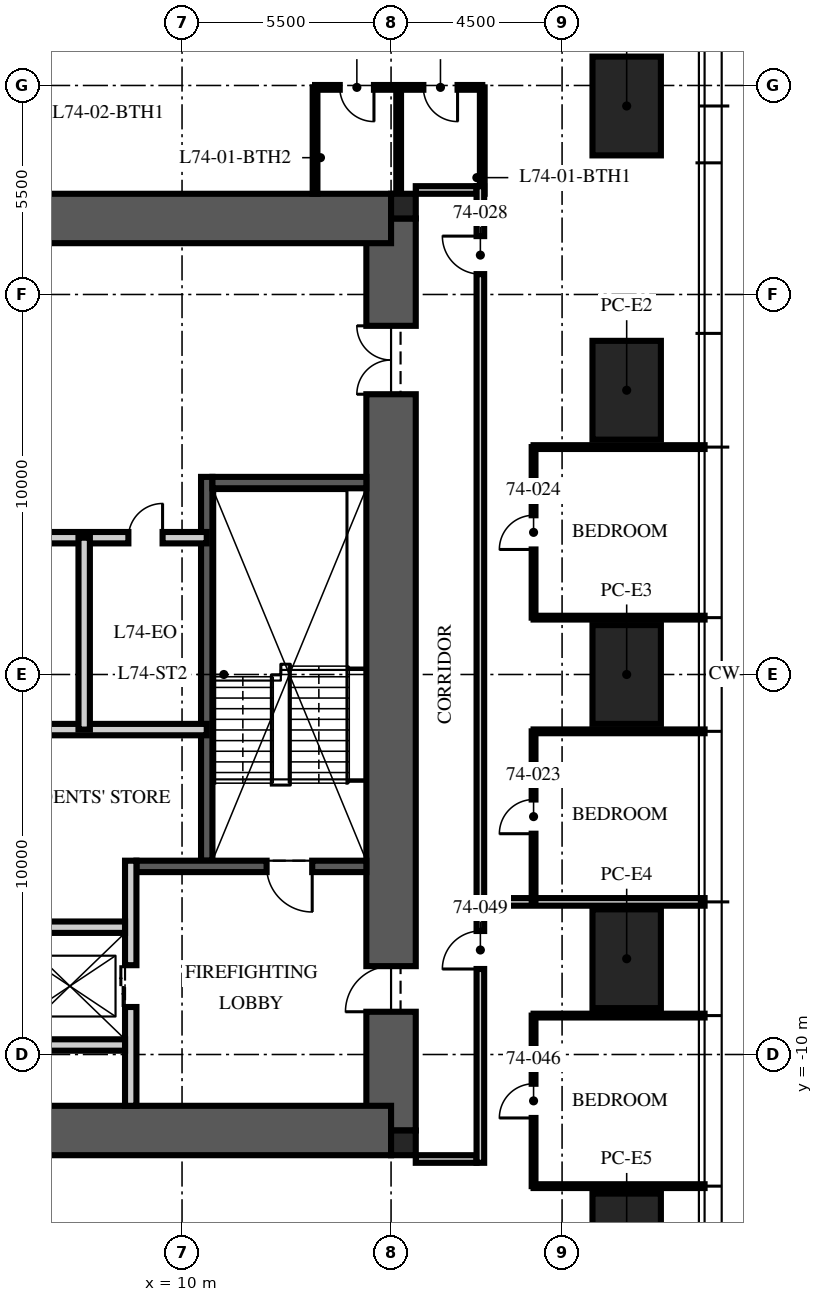
"""IFC4 building model, lengths in metres.
Left out: names, types, materials, properties, quantities, classifications, styles, units other than length and angle.
Written with IfcOpenShell. Run it as: python <this file> out.ifc"""

import sys

from ifc_helpers import new_model, si_unit, direction, frame, frame_2d, origin, origin_2d, place, context, subcontext, project, spatial, rectangle, extrude, element, fill, save


model = new_model("IFC4")
c1 = context("Model", 3, precision=1e-05, world=origin(), true_north=direction((0.0, 1.0)))
c2 = subcontext(c1, "Body", "Model", "MODEL_VIEW")
j1 = project(units=[si_unit("LENGTHUNIT", "METRE"), si_unit("PLANEANGLEUNIT", "RADIAN")], contexts=[c1])
p1 = place(None, origin())
s1 = spatial("IfcSite", under=j1, at=p1, CompositionType="ELEMENT")
p2 = place(p1, origin())
s2 = spatial("IfcBuilding", under=s1, at=p2, CompositionType="ELEMENT")
p3 = place(p2, frame((0.0, 0.0, 297.0)))
s3 = spatial("IfcBuildingStorey", under=s2, at=p3, CompositionType="ELEMENT", Elevation=297.0)
p4 = place(p3, frame((15.5, -12.0, -0.25), z_axis=(0.0, 0.0, 1.0), x_axis=(0.0, 1.0, 0.0)))
e1 = element("IfcWall", 1, at=p4, inside=s3, PredefinedType="SHEAR", context=c2, shape_type="SweptSolid", body=[
    extrude(rectangle(XDim=24.0, YDim=1.3, at=frame_2d((12.0, 0.0))), origin(), (0.0, 0.0, 1.0), 3.75),
])
p5 = place(p4, frame((3.125, 0.0, 0.25)))
e2 = element("IfcOpeningElement", 2, at=p5, cuts=e1, PredefinedType="OPENING", context=c2, shape_type="SweptSolid", body=[
    extrude(rectangle(XDim=1.2, YDim=2.1, at=frame_2d((0.6, 1.05))), frame((0.0, 0.66, 0.0), z_axis=(0.0, -1.0, 0.0), x_axis=(1.0, 0.0, 0.0)), (0.0, 0.0, 1.0), 1.32),
])
p6 = place(p4, frame((19.375, 0.0, 0.25)))
e3 = element("IfcOpeningElement", 3, at=p6, cuts=e1, PredefinedType="OPENING", context=c2, shape_type="SweptSolid", body=[
    extrude(rectangle(XDim=1.8, YDim=2.1, at=frame_2d((0.9, 1.05))), frame((0.0, 0.66, 0.0), z_axis=(0.0, -1.0, 0.0), x_axis=(1.0, 0.0, 0.0)), (0.0, 0.0, 1.0), 1.32),
])
for number, where, z_axis, x_axis in (
    (4, (-15.5, 12.0, -0.25), (0.0, 0.0, 1.0), (1.0, 0.0, 0.0)),
    (5, (-15.5, -12.0, -0.25), (0.0, 0.0, 1.0), (1.0, 0.0, 0.0)),
):
    element("IfcWall", number, at=place(p3, frame(where, z_axis=z_axis, x_axis=x_axis)), inside=s3, PredefinedType="SHEAR", context=c2, shape_type="SweptSolid", body=[
        extrude(rectangle(XDim=31.0, YDim=1.3, at=frame_2d((15.5, 0.0))), origin(), (0.0, 0.0, 1.0), 3.75),
    ])
for number, where, z_axis, x_axis in (
    (6, (15.825, 12.325, -0.25), (0.0, 0.0, 1.0), (1.0, 0.0, 0.0)),
    (7, (15.825, -12.325, -0.25), (0.0, 0.0, 1.0), (1.0, 0.0, 0.0)),
):
    element("IfcColumn", number, at=place(p3, frame(where, z_axis=z_axis, x_axis=x_axis)), inside=s3, PredefinedType="COLUMN", context=c2, shape_type="SweptSolid", body=[
        extrude(rectangle(XDim=0.65, YDim=0.65, at=origin_2d()), origin(), (0.0, 0.0, 1.0), 3.75),
    ])
for number, where, z_axis, x_axis in (
    (8, (21.7, 14.96, 0.0), (0.0, 0.0, 1.0), (0.0, 1.0, 0.0)),
    (9, (21.7, 7.48, 0.0), (0.0, 0.0, 1.0), (0.0, 1.0, 0.0)),
    (10, (21.7, 0.0, 0.0), (0.0, 0.0, 1.0), (0.0, 1.0, 0.0)),
    (11, (21.7, -7.48, 0.0), (0.0, 0.0, 1.0), (0.0, 1.0, 0.0)),
    (12, (21.7, -14.96, 0.0), (0.0, 0.0, 1.0), (0.0, 1.0, 0.0)),
):
    element("IfcColumn", number, at=place(p3, frame(where, z_axis=z_axis, x_axis=x_axis)), inside=s3, PredefinedType="COLUMN", context=c2, shape_type="SweptSolid", body=[
        extrude(rectangle(XDim=2.6, YDim=1.8, at=origin_2d()), origin(), (0.0, 0.0, 1.0), 3.75),
    ])
p7 = place(p3, frame((10.65, -4.9, 0.0), z_axis=(0.0, 0.0, 1.0), x_axis=(0.0, 1.0, 0.0)))
e13 = element("IfcWall", 13, at=p7, inside=s3, PredefinedType="SOLIDWALL", context=c2, shape_type="SweptSolid", body=[
    extrude(rectangle(XDim=10.1, YDim=0.3, at=frame_2d((5.05, 0.0))), origin(), (0.0, 0.0, 1.0), 3.5),
])
p8 = place(p3, frame((14.85, -5.05, 0.0), z_axis=(0.0, 0.0, 1.0), x_axis=(-1.0, 0.0, 0.0)))
e14 = element("IfcWall", 14, at=p8, inside=s3, PredefinedType="SOLIDWALL", context=c2, shape_type="SweptSolid", body=[
    extrude(rectangle(XDim=6.05, YDim=0.3, at=frame_2d((3.025, 0.0))), origin(), (0.0, 0.0, 1.0), 3.5),
])
p9 = place(p8, frame((1.425, 0.0, 0.0)))
e15 = element("IfcOpeningElement", 15, at=p9, cuts=e14, PredefinedType="OPENING", context=c2, shape_type="SweptSolid", body=[
    extrude(rectangle(XDim=1.2, YDim=2.1, at=frame_2d((0.6, 1.05))), frame((0.0, 0.16, 0.0), z_axis=(0.0, -1.0, 0.0), x_axis=(1.0, 0.0, 0.0)), (0.0, 0.0, 1.0), 0.32),
])
p10 = place(p3, frame((14.85, 5.05, 0.0), z_axis=(0.0, 0.0, 1.0), x_axis=(-1.0, 0.0, 0.0)))
e16 = element("IfcWall", 16, at=p10, inside=s3, PredefinedType="SOLIDWALL", context=c2, shape_type="SweptSolid", body=[
    extrude(rectangle(XDim=4.05, YDim=0.3, at=frame_2d((2.025, 0.0))), origin(), (0.0, 0.0, 1.0), 3.5),
])
p11 = place(p3, frame((8.65, -11.35, 0.0), z_axis=(0.0, 0.0, 1.0), x_axis=(0.0, 1.0, 0.0)))
e17 = element("IfcWall", 17, at=p11, inside=s3, PredefinedType="PARTITIONING", context=c2, shape_type="SweptSolid", body=[
    extrude(rectangle(XDim=6.45, YDim=0.3, at=frame_2d((3.225, 0.0))), origin(), (0.0, 0.0, 1.0), 3.5),
])
p12 = place(p11, frame((2.6, 0.0, 0.0)))
e18 = element("IfcOpeningElement", 18, at=p12, cuts=e17, PredefinedType="OPENING", context=c2, shape_type="SweptSolid", body=[
    extrude(rectangle(XDim=1.1, YDim=2.1, at=frame_2d((0.55, 1.05))), frame((0.0, 0.16, 0.0), z_axis=(0.0, -1.0, 0.0), x_axis=(1.0, 0.0, 0.0)), (0.0, 0.0, 1.0), 0.32),
])
p13 = place(p3, frame((-8.5, -6.65, 0.0), z_axis=(0.0, 0.0, 1.0), x_axis=(1.0, 0.0, 0.0)))
e19 = element("IfcWall", 19, at=p13, inside=s3, PredefinedType="PARTITIONING", context=c2, shape_type="SweptSolid", body=[
    extrude(rectangle(XDim=17.0, YDim=0.3, at=frame_2d((8.5, 0.0))), origin(), (0.0, 0.0, 1.0), 3.5),
])
p14 = place(p13, frame((7.8, 0.0, 0.0)))
e20 = element("IfcOpeningElement", 20, at=p14, cuts=e19, PredefinedType="OPENING", context=c2, shape_type="SweptSolid", body=[
    extrude(rectangle(XDim=1.3, YDim=2.4, at=frame_2d((0.65, 1.2))), frame((0.0, 0.16, 0.0), z_axis=(0.0, -1.0, 0.0), x_axis=(1.0, 0.0, 0.0)), (0.0, 0.0, 1.0), 0.32),
])
p15 = place(p13, frame((5.65, 0.0, 0.0)))
e21 = element("IfcOpeningElement", 21, at=p15, cuts=e19, PredefinedType="OPENING", context=c2, shape_type="SweptSolid", body=[
    extrude(rectangle(XDim=0.9, YDim=2.1, at=frame_2d((0.45, 1.05))), frame((0.0, 0.16, 0.0), z_axis=(0.0, -1.0, 0.0), x_axis=(1.0, 0.0, 0.0)), (0.0, 0.0, 1.0), 0.32),
])
p16 = place(p13, frame((10.4, 0.0, 0.0)))
e22 = element("IfcOpeningElement", 22, at=p16, cuts=e19, PredefinedType="OPENING", context=c2, shape_type="SweptSolid", body=[
    extrude(rectangle(XDim=0.9, YDim=2.1, at=frame_2d((0.45, 1.05))), frame((0.0, 0.16, 0.0), z_axis=(0.0, -1.0, 0.0), x_axis=(1.0, 0.0, 0.0)), (0.0, 0.0, 1.0), 0.32),
])
p17 = place(p3, frame((5.6, -9.75, 0.0), z_axis=(0.0, 0.0, 1.0), x_axis=(1.0, 0.0, 0.0)))
e23 = element("IfcWall", 23, at=p17, inside=s3, PredefinedType="PARTITIONING", context=c2, shape_type="SweptSolid", body=[
    extrude(rectangle(XDim=2.9, YDim=0.3, at=frame_2d((1.45, 0.0))), origin(), (0.0, 0.0, 1.0), 3.5),
])
p18 = place(p3, frame((-10.65, 3.6, 0.0), z_axis=(0.0, 0.0, 1.0), x_axis=(1.0, 0.0, 0.0)))
e24 = element("IfcWall", 24, at=p18, inside=s3, PredefinedType="PARTITIONING", context=c2, shape_type="SweptSolid", body=[
    extrude(rectangle(XDim=21.3, YDim=0.3, at=frame_2d((10.65, 0.0))), origin(), (0.0, 0.0, 1.0), 3.5),
])
p19 = place(p18, frame((10.05, 0.0, 0.0)))
e25 = element("IfcOpeningElement", 25, at=p19, cuts=e24, PredefinedType="OPENING", context=c2, shape_type="SweptSolid", body=[
    extrude(rectangle(XDim=1.2, YDim=2.1, at=frame_2d((0.6, 1.05))), frame((0.0, 0.16, 0.0), z_axis=(0.0, -1.0, 0.0), x_axis=(1.0, 0.0, 0.0)), (0.0, 0.0, 1.0), 0.32),
])
p20 = place(p18, frame((19.238, 0.0, 0.0)))
e26 = element("IfcOpeningElement", 26, at=p20, cuts=e24, PredefinedType="OPENING", context=c2, shape_type="SweptSolid", body=[
    extrude(rectangle(XDim=0.9, YDim=2.1, at=frame_2d((0.45, 1.05))), frame((0.0, 0.16, 0.0), z_axis=(0.0, -1.0, 0.0), x_axis=(1.0, 0.0, 0.0)), (0.0, 0.0, 1.0), 0.32),
])
p21 = place(p3, frame((10.65, -1.45, 0.0), z_axis=(0.0, 0.0, 1.0), x_axis=(-1.0, 0.0, 0.0)))
e27 = element("IfcWall", 27, at=p21, inside=s3, PredefinedType="PARTITIONING", context=c2, shape_type="SweptSolid", body=[
    extrude(rectangle(XDim=6.45, YDim=0.3, at=frame_2d((3.225, 0.0))), origin(), (0.0, 0.0, 1.0), 3.5),
])
p22 = place(p3, frame((7.425, -1.45, 0.0), z_axis=(0.0, 0.0, 1.0), x_axis=(0.0, 1.0, 0.0)))
e28 = element("IfcWall", 28, at=p22, inside=s3, PredefinedType="PARTITIONING", context=c2, shape_type="SweptSolid", body=[
    extrude(rectangle(XDim=5.05, YDim=0.3, at=frame_2d((2.525, 0.0))), origin(), (0.0, 0.0, 1.0), 3.5),
])
for number, where, z_axis, x_axis in (
    (29, (16.15, 12.75, 0.0), (0.0, 0.0, 1.0), (1.0, 0.0, 0.0)),
    (30, (16.15, -12.75, 0.0), (0.0, 0.0, 1.0), (1.0, 0.0, 0.0)),
):
    element("IfcWall", number, at=place(p3, frame(where, z_axis=z_axis, x_axis=x_axis)), inside=s3, PredefinedType="PARTITIONING", context=c2, shape_type="SweptSolid", body=[
        extrude(rectangle(XDim=1.6, YDim=0.2, at=frame_2d((0.8, 0.0))), origin(), (0.0, 0.0, 1.0), 2.6),
    ])
p23 = place(p3, frame((17.95, -5.984, 0.0), z_axis=(0.0, 0.0, 1.0), x_axis=(1.0, 0.0, 0.0)))
e31 = element("IfcWall", 31, at=p23, inside=s3, PredefinedType="PARTITIONING", context=c2, shape_type="SweptSolid", body=[
    extrude(rectangle(XDim=5.8, YDim=0.2, at=frame_2d((2.9, 0.0))), origin(), (0.0, 0.0, 1.0), 3.01),
])
for number, where, z_axis, x_axis in (
    (32, (19.25, -1.496, 0.0), (0.0, 0.0, 1.0), (1.0, 0.0, 0.0)),
    (33, (19.25, 1.496, 0.0), (0.0, 0.0, 1.0), (1.0, 0.0, 0.0)),
    (34, (19.25, 5.984, 0.0), (0.0, 0.0, 1.0), (1.0, 0.0, 0.0)),
    (35, (19.25, -13.464, 0.0), (0.0, 0.0, 1.0), (1.0, 0.0, 0.0)),
    (36, (19.25, -8.976, 0.0), (0.0, 0.0, 1.0), (1.0, 0.0, 0.0)),
):
    element("IfcWall", number, at=place(p3, frame(where, z_axis=z_axis, x_axis=x_axis)), inside=s3, PredefinedType="PARTITIONING", context=c2, shape_type="SweptSolid", body=[
        extrude(rectangle(XDim=4.5, YDim=0.1, at=frame_2d((2.25, 0.0))), origin(), (0.0, 0.0, 1.0), 3.01),
    ])
p24 = place(p3, frame((19.25, -5.984, 0.0), z_axis=(0.0, 0.0, 1.0), x_axis=(0.0, 1.0, 0.0)))
e37 = element("IfcWall", 37, at=p24, inside=s3, PredefinedType="PARTITIONING", context=c2, shape_type="SweptSolid", body=[
    extrude(rectangle(XDim=4.488, YDim=0.1, at=frame_2d((2.244, 0.0))), origin(), (0.0, 0.0, 1.0), 2.91),
])
p25 = place(p24, frame((1.794, 0.0, 0.0)))
e38 = element("IfcOpeningElement", 38, at=p25, cuts=e37, PredefinedType="OPENING", context=c2, shape_type="SweptSolid", body=[
    extrude(rectangle(XDim=0.9, YDim=2.1, at=frame_2d((0.45, 1.05))), frame((0.0, 0.06, 0.0), z_axis=(0.0, -1.0, 0.0), x_axis=(1.0, 0.0, 0.0)), (0.0, 0.0, 1.0), 0.12),
])
p26 = place(p3, frame((19.25, 1.496, 0.0), z_axis=(0.0, 0.0, 1.0), x_axis=(0.0, 1.0, 0.0)))
e39 = element("IfcWall", 39, at=p26, inside=s3, PredefinedType="PARTITIONING", context=c2, shape_type="SweptSolid", body=[
    extrude(rectangle(XDim=4.488, YDim=0.1, at=frame_2d((2.244, 0.0))), origin(), (0.0, 0.0, 1.0), 2.91),
])
p27 = place(p26, frame((1.794, 0.0, 0.0)))
e40 = element("IfcOpeningElement", 40, at=p27, cuts=e39, PredefinedType="OPENING", context=c2, shape_type="SweptSolid", body=[
    extrude(rectangle(XDim=0.9, YDim=2.1, at=frame_2d((0.45, 1.05))), frame((0.0, 0.06, 0.0), z_axis=(0.0, -1.0, 0.0), x_axis=(1.0, 0.0, 0.0)), (0.0, 0.0, 1.0), 0.12),
])
p28 = place(p3, frame((17.9, 15.45, 0.0), z_axis=(0.0, 0.0, 1.0), x_axis=(-1.0, 0.0, 0.0)))
e41 = element("IfcWall", 41, at=p28, inside=s3, PredefinedType="PARTITIONING", context=c2, shape_type="SweptSolid", body=[
    extrude(rectangle(XDim=4.4, YDim=0.125, at=frame_2d((2.2, 0.0))), origin(), (0.0, 0.0, 1.0), 2.6),
])
p29 = place(p28, frame((0.65, 0.0, 0.0)))
e42 = element("IfcOpeningElement", 42, at=p29, cuts=e41, PredefinedType="OPENING", context=c2, shape_type="SweptSolid", body=[
    extrude(rectangle(XDim=0.9, YDim=2.1, at=frame_2d((0.45, 1.05))), frame((0.0, 0.073, 0.0), z_axis=(0.0, -1.0, 0.0), x_axis=(1.0, 0.0, 0.0)), (0.0, 0.0, 1.0), 0.145),
])
p30 = place(p28, frame((2.85, 0.0, 0.0)))
e43 = element("IfcOpeningElement", 43, at=p30, cuts=e41, PredefinedType="OPENING", context=c2, shape_type="SweptSolid", body=[
    extrude(rectangle(XDim=0.9, YDim=2.1, at=frame_2d((0.45, 1.05))), frame((0.0, 0.073, 0.0), z_axis=(0.0, -1.0, 0.0), x_axis=(1.0, 0.0, 0.0)), (0.0, 0.0, 1.0), 0.145),
])
p31 = place(p3, frame((17.9, 12.65, 0.0), z_axis=(0.0, 0.0, 1.0), x_axis=(0.0, 1.0, 0.0)))
e44 = element("IfcWall", 44, at=p31, inside=s3, PredefinedType="PARTITIONING", context=c2, shape_type="SweptSolid", body=[
    extrude(rectangle(XDim=2.8, YDim=0.125, at=frame_2d((1.4, 0.0))), origin(), (0.0, 0.0, 1.0), 2.9),
])
p32 = place(p3, frame((15.7, 12.65, 0.0), z_axis=(0.0, 0.0, 1.0), x_axis=(0.0, 1.0, 0.0)))
e45 = element("IfcWall", 45, at=p32, inside=s3, PredefinedType="PARTITIONING", context=c2, shape_type="SweptSolid", body=[
    extrude(rectangle(XDim=2.8, YDim=0.125, at=frame_2d((1.4, 0.0))), origin(), (0.0, 0.0, 1.0), 2.6),
])
p33 = place(p3, frame((13.5, 12.65, 0.0), z_axis=(0.0, 0.0, 1.0), x_axis=(0.0, 1.0, 0.0)))
e46 = element("IfcWall", 46, at=p33, inside=s3, PredefinedType="PARTITIONING", context=c2, shape_type="SweptSolid", body=[
    extrude(rectangle(XDim=2.8, YDim=0.125, at=frame_2d((1.4, 0.0))), origin(), (0.0, 0.0, 1.0), 3.5),
])
p34 = place(p3, frame((19.25, -13.464, 0.0), z_axis=(0.0, 0.0, 1.0), x_axis=(0.0, 1.0, 0.0)))
e47 = element("IfcWall", 47, at=p34, inside=s3, PredefinedType="PARTITIONING", context=c2, shape_type="SweptSolid", body=[
    extrude(rectangle(XDim=4.488, YDim=0.1, at=frame_2d((2.244, 0.0))), origin(), (0.0, 0.0, 1.0), 2.91),
])
p35 = place(p34, frame((1.794, 0.0, 0.0)))
e48 = element("IfcOpeningElement", 48, at=p35, cuts=e47, PredefinedType="OPENING", context=c2, shape_type="SweptSolid", body=[
    extrude(rectangle(XDim=0.9, YDim=2.1, at=frame_2d((0.45, 1.05))), frame((0.0, 0.06, 0.0), z_axis=(0.0, -1.0, 0.0), x_axis=(1.0, 0.0, 0.0)), (0.0, 0.0, 1.0), 0.12),
])
p36 = place(p3, frame((17.85, -12.85, 0.0), z_axis=(0.0, 0.0, 1.0), x_axis=(0.0, 1.0, 0.0)))
e49 = element("IfcWall", 49, at=p36, inside=s3, PredefinedType="PARTITIONING", context=c2, shape_type="SweptSolid", body=[
    extrude(rectangle(XDim=25.7, YDim=0.2, at=frame_2d((12.85, 0.0))), origin(), (0.0, 0.0, 1.0), 2.9),
])
p37 = place(p36, frame((23.386, 0.0, 0.0)))
e50 = element("IfcOpeningElement", 50, at=p37, cuts=e49, PredefinedType="OPENING", context=c2, shape_type="SweptSolid", body=[
    extrude(rectangle(XDim=1.0, YDim=2.2, at=frame_2d((0.5, 1.1))), frame((0.0, 0.11, 0.0), z_axis=(0.0, -1.0, 0.0), x_axis=(1.0, 0.0, 0.0)), (0.0, 0.0, 1.0), 0.22),
])
p38 = place(p36, frame((5.1, 0.0, 0.0)))
e51 = element("IfcOpeningElement", 51, at=p38, cuts=e49, PredefinedType="OPENING", context=c2, shape_type="SweptSolid", body=[
    extrude(rectangle(XDim=1.0, YDim=2.2, at=frame_2d((0.5, 1.1))), frame((0.0, 0.11, 0.0), z_axis=(0.0, -1.0, 0.0), x_axis=(1.0, 0.0, 0.0)), (0.0, 0.0, 1.0), 0.22),
])
p39 = place(p9, origin())
e52 = element("IfcDoor", 52, at=p39, inside=s3, OperationType="SINGLE_SWING_LEFT", PredefinedType="DOOR", context=c2, shape_type="SweptSolid", body=[
    extrude(rectangle(XDim=1.2, YDim=2.1, at=frame_2d((0.6, 1.05))), frame((0.0, 0.025, 0.0), z_axis=(0.0, -1.0, 0.0), x_axis=(1.0, 0.0, 0.0)), (0.0, 0.0, 1.0), 0.05),
])
fill(e15, e52)
p40 = place(p5, origin())
e53 = element("IfcDoor", 53, at=p40, inside=s3, OperationType="SINGLE_SWING_LEFT", PredefinedType="DOOR", context=c2, shape_type="SweptSolid", body=[
    extrude(rectangle(XDim=1.2, YDim=2.1, at=frame_2d((0.6, 1.05))), frame((0.0, 0.025, 0.0), z_axis=(0.0, -1.0, 0.0), x_axis=(1.0, 0.0, 0.0)), (0.0, 0.0, 1.0), 0.05),
])
fill(e2, e53)
p41 = place(p6, origin())
e54 = element("IfcDoor", 54, at=p41, inside=s3, OperationType="DOUBLE_DOOR_SINGLE_SWING", PredefinedType="DOOR", context=c2, shape_type="SweptSolid", body=[
    extrude(rectangle(XDim=1.8, YDim=2.1, at=frame_2d((0.9, 1.05))), frame((0.0, 0.025, 0.0), z_axis=(0.0, -1.0, 0.0), x_axis=(1.0, 0.0, 0.0)), (0.0, 0.0, 1.0), 0.05),
])
fill(e3, e54)
p42 = place(p12, origin())
e55 = element("IfcDoor", 55, at=p42, inside=s3, OperationType="DOUBLE_DOOR_SLIDING", PredefinedType="DOOR", context=c2, shape_type="SweptSolid", body=[
    extrude(rectangle(XDim=1.1, YDim=2.1, at=frame_2d((0.55, 1.05))), frame((0.0, 0.025, 0.0), z_axis=(0.0, -1.0, 0.0), x_axis=(1.0, 0.0, 0.0)), (0.0, 0.0, 1.0), 0.05),
])
fill(e18, e55)
p43 = place(p20, origin())
e56 = element("IfcDoor", 56, at=p43, inside=s3, OperationType="SINGLE_SWING_RIGHT", PredefinedType="DOOR", context=c2, shape_type="SweptSolid", body=[
    extrude(rectangle(XDim=0.9, YDim=2.1, at=frame_2d((0.45, 1.05))), frame((0.0, 0.025, 0.0), z_axis=(0.0, -1.0, 0.0), x_axis=(1.0, 0.0, 0.0)), (0.0, 0.0, 1.0), 0.05),
])
fill(e26, e56)
p44 = place(p25, origin())
e57 = element("IfcDoor", 57, at=p44, inside=s3, OperationType="SINGLE_SWING_LEFT", PredefinedType="DOOR", context=c2, shape_type="SweptSolid", body=[
    extrude(rectangle(XDim=0.9, YDim=2.1, at=frame_2d((0.45, 1.05))), frame((0.0, 0.025, 0.0), z_axis=(0.0, -1.0, 0.0), x_axis=(1.0, 0.0, 0.0)), (0.0, 0.0, 1.0), 0.05),
])
fill(e38, e57)
p45 = place(p27, origin())
e58 = element("IfcDoor", 58, at=p45, inside=s3, OperationType="SINGLE_SWING_LEFT", PredefinedType="DOOR", context=c2, shape_type="SweptSolid", body=[
    extrude(rectangle(XDim=0.9, YDim=2.1, at=frame_2d((0.45, 1.05))), frame((0.0, 0.025, 0.0), z_axis=(0.0, -1.0, 0.0), x_axis=(1.0, 0.0, 0.0)), (0.0, 0.0, 1.0), 0.05),
])
fill(e40, e58)
p46 = place(p29, origin())
e59 = element("IfcDoor", 59, at=p46, inside=s3, OperationType="SINGLE_SWING_LEFT", PredefinedType="DOOR", context=c2, shape_type="SweptSolid", body=[
    extrude(rectangle(XDim=0.9, YDim=2.1, at=frame_2d((0.45, 1.05))), frame((0.0, 0.025, 0.0), z_axis=(0.0, -1.0, 0.0), x_axis=(1.0, 0.0, 0.0)), (0.0, 0.0, 1.0), 0.05),
])
fill(e42, e59)
p47 = place(p30, origin())
e60 = element("IfcDoor", 60, at=p47, inside=s3, OperationType="SINGLE_SWING_LEFT", PredefinedType="DOOR", context=c2, shape_type="SweptSolid", body=[
    extrude(rectangle(XDim=0.9, YDim=2.1, at=frame_2d((0.45, 1.05))), frame((0.0, 0.025, 0.0), z_axis=(0.0, -1.0, 0.0), x_axis=(1.0, 0.0, 0.0)), (0.0, 0.0, 1.0), 0.05),
])
fill(e43, e60)
p48 = place(p37, origin())
e61 = element("IfcDoor", 61, at=p48, inside=s3, OperationType="SINGLE_SWING_RIGHT", PredefinedType="DOOR", context=c2, shape_type="SweptSolid", body=[
    extrude(rectangle(XDim=1.0, YDim=2.2, at=frame_2d((0.5, 1.1))), frame((0.0, 0.025, 0.0), z_axis=(0.0, -1.0, 0.0), x_axis=(1.0, 0.0, 0.0)), (0.0, 0.0, 1.0), 0.05),
])
fill(e50, e61)
p49 = place(p35, origin())
e62 = element("IfcDoor", 62, at=p49, inside=s3, OperationType="SINGLE_SWING_LEFT", PredefinedType="DOOR", context=c2, shape_type="SweptSolid", body=[
    extrude(rectangle(XDim=0.9, YDim=2.1, at=frame_2d((0.45, 1.05))), frame((0.0, 0.025, 0.0), z_axis=(0.0, -1.0, 0.0), x_axis=(1.0, 0.0, 0.0)), (0.0, 0.0, 1.0), 0.05),
])
fill(e48, e62)
p50 = place(p38, origin())
e63 = element("IfcDoor", 63, at=p50, inside=s3, OperationType="SINGLE_SWING_LEFT", PredefinedType="DOOR", context=c2, shape_type="SweptSolid", body=[
    extrude(rectangle(XDim=1.0, YDim=2.2, at=frame_2d((0.5, 1.1))), frame((0.0, 0.025, 0.0), z_axis=(0.0, -1.0, 0.0), x_axis=(1.0, 0.0, 0.0)), (0.0, 0.0, 1.0), 0.05),
])
fill(e51, e63)
save(model, sys.argv[1])
